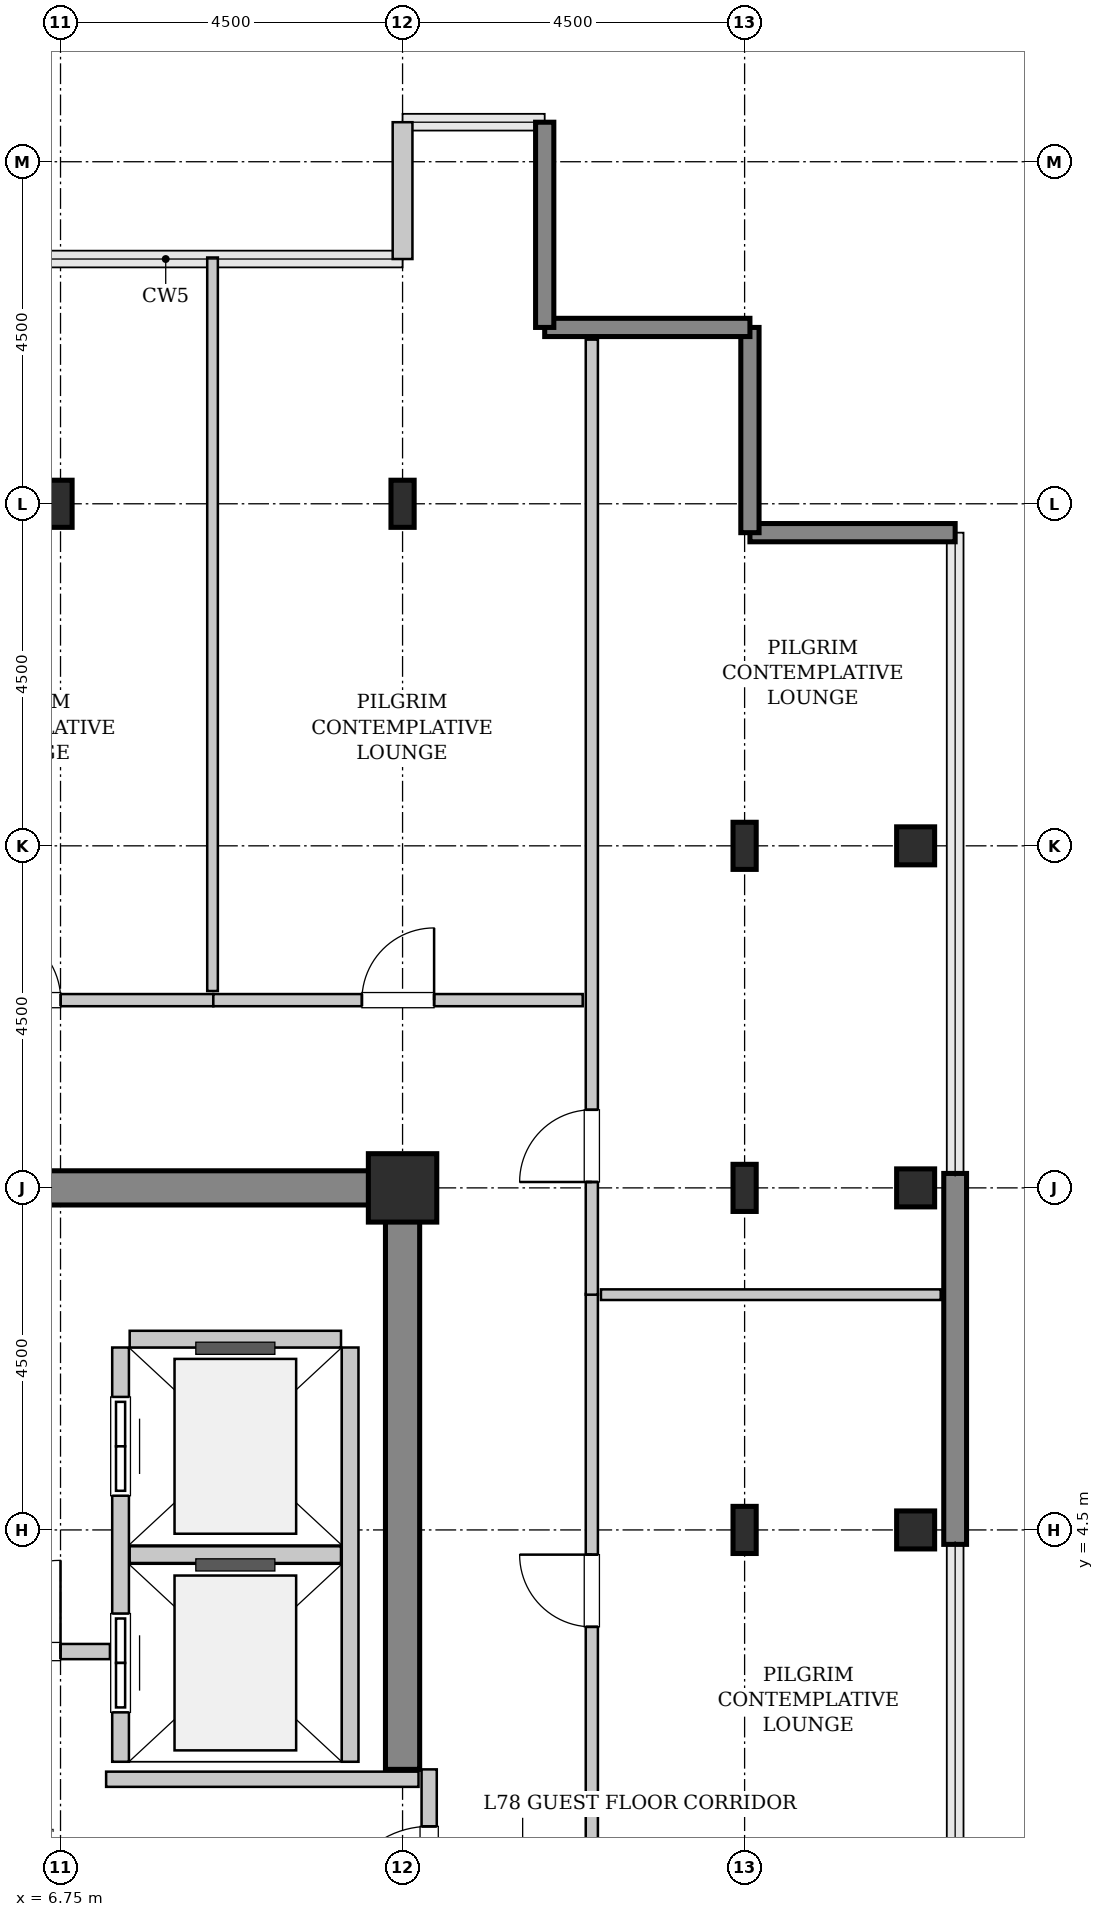
"""IFC4 building model, lengths in metres.
Left out: names, types, materials, properties, quantities, classifications, styles, units other than length and angle.
Written with IfcOpenShell. Run it as: python <this file> out.ifc"""

import sys

from ifc_helpers import new_model, si_unit, direction, frame, frame_2d, origin, origin_2d, place, context, subcontext, project, spatial, rectangle, hollow_rectangle, i_section, extrude, source, transform, mapped, element, fill, save


model = new_model("IFC4")
c1 = context("Model", 3, precision=1e-05, world=origin(), true_north=direction((0.0, 1.0)))
c2 = subcontext(c1, "Body", "Model", "MODEL_VIEW")
j1 = project(units=[si_unit("LENGTHUNIT", "METRE"), si_unit("PLANEANGLEUNIT", "RADIAN")], contexts=[c1])
p1 = place(None, origin())
s1 = spatial("IfcSite", under=j1, at=p1, CompositionType="ELEMENT")
p2 = place(p1, origin())
s2 = spatial("IfcBuilding", under=s1, at=p2, CompositionType="ELEMENT")
p3 = place(p2, frame((0.0, 0.0, 310.2)))
s3 = spatial("IfcBuildingStorey", under=s2, at=p3, CompositionType="ELEMENT", Elevation=310.2)
m1 = source(origin(), c2, "Body", "SweptSolid", [
    extrude(rectangle(XDim=9.925, YDim=0.45, at=frame_2d((4.962, 0.0))), origin(), (0.0, 0.0, 1.0), 3.8),
])
p4 = place(p3, frame((1.55, 9.0, 0.0), z_axis=(0.0, 0.0, 1.0), x_axis=(1.0, 0.0, 0.0)))
e1 = element("IfcWall", 1, at=p4, inside=s3, PredefinedType="SHEAR", context=c2, shape_type="MappedRepresentation", body=[
    mapped(m1, transform((0.0, 0.0, 0.0), x_axis=(1.0, 0.0, 0.0), y_axis=(0.0, 1.0, 0.0), z_axis=(0.0, 0.0, 1.0), scale=1.0)),
])
m2 = source(origin(), c2, "Body", "SweptSolid", [
    extrude(rectangle(XDim=7.425, YDim=0.45, at=frame_2d((3.712, 0.0))), origin(), (0.0, 0.0, 1.0), 3.8),
])
p5 = place(p3, frame((11.25, 1.35, 0.0), z_axis=(0.0, 0.0, 1.0), x_axis=(0.0, 1.0, 0.0)))
e2 = element("IfcWall", 2, at=p5, inside=s3, PredefinedType="SHEAR", context=c2, shape_type="MappedRepresentation", body=[
    mapped(m2, transform((0.0, 0.0, 0.0), x_axis=(1.0, 0.0, 0.0), y_axis=(0.0, 1.0, 0.0), z_axis=(0.0, 0.0, 1.0), scale=1.0)),
])
m3 = source(origin(), c2, "Body", "SweptSolid", [
    extrude(i_section(OverallWidth=0.305, OverallDepth=0.62, WebThickness=0.021, FlangeThickness=0.04, FilletRadius=0.027, at=origin_2d()), origin(), (0.0, 0.0, 1.0), 3.8),
])
p6 = place(p3, frame((6.75, 18.0, 0.0), z_axis=(0.0, 0.0, 1.0), x_axis=(1.0, 0.0, 0.0)))
e3 = element("IfcColumn", 3, at=p6, inside=s3, PredefinedType="COLUMN", context=c2, shape_type="MappedRepresentation", body=[
    mapped(m3, transform((0.0, 0.0, 0.0), x_axis=(1.0, 0.0, 0.0), y_axis=(0.0, 1.0, 0.0), z_axis=(0.0, 0.0, 1.0), scale=1.0)),
])
m4 = source(origin(), c2, "Body", "SweptSolid", [
    extrude(rectangle(XDim=0.9, YDim=0.9, at=origin_2d()), origin(), (0.0, 0.0, 1.0), 3.8),
])
p7 = place(p3, frame((11.25, 9.0, 0.0), z_axis=(0.0, 0.0, 1.0), x_axis=(1.0, 0.0, 0.0)))
e4 = element("IfcColumn", 4, at=p7, inside=s3, PredefinedType="COLUMN", context=c2, shape_type="MappedRepresentation", body=[
    mapped(m4, transform((0.0, 0.0, 0.0), x_axis=(1.0, 0.0, 0.0), y_axis=(0.0, 1.0, 0.0), z_axis=(0.0, 0.0, 1.0), scale=1.0)),
])
for number, where, z_axis, x_axis in (
    (5, (11.25, 18.0, 0.0), (0.0, 0.0, 1.0), (1.0, 0.0, 0.0)),
    (6, (15.75, 4.5, 0.0), (0.0, 0.0, 1.0), (1.0, 0.0, 0.0)),
    (7, (15.75, 9.0, 0.0), (0.0, 0.0, 1.0), (1.0, 0.0, 0.0)),
    (8, (15.75, 13.5, 0.0), (0.0, 0.0, 1.0), (1.0, 0.0, 0.0)),
):
    element("IfcColumn", number, at=place(p3, frame(where, z_axis=z_axis, x_axis=x_axis)), inside=s3, PredefinedType="COLUMN", context=c2, shape_type="MappedRepresentation", body=[
        mapped(m3, transform((0.0, 0.0, 0.0), x_axis=(1.0, 0.0, 0.0), y_axis=(0.0, 1.0, 0.0), z_axis=(0.0, 0.0, 1.0), scale=1.0)),
    ])
m5 = source(origin(), c2, "Body", "SweptSolid", [
    extrude(hollow_rectangle(XDim=0.5, YDim=0.5, WallThickness=0.025, InnerFilletRadius=0.025, OuterFilletRadius=0.05, at=origin_2d()), origin(), (0.0, 0.0, 1.0), 3.8),
])
for number, where, z_axis, x_axis in (
    (9, (18.0, 4.5, 0.0), (0.0, 0.0, 1.0), (1.0, 0.0, 0.0)),
    (10, (18.0, 9.0, 0.0), (0.0, 0.0, 1.0), (1.0, 0.0, 0.0)),
    (11, (18.0, 13.5, 0.0), (0.0, 0.0, 1.0), (1.0, 0.0, 0.0)),
):
    element("IfcColumn", number, at=place(p3, frame(where, z_axis=z_axis, x_axis=x_axis)), inside=s3, PredefinedType="COLUMN", context=c2, shape_type="MappedRepresentation", body=[
        mapped(m5, transform((0.0, 0.0, 0.0), x_axis=(1.0, 0.0, 0.0), y_axis=(0.0, 1.0, 0.0), z_axis=(0.0, 0.0, 1.0), scale=1.0)),
    ])
m6 = source(origin(), c2, "Body", "SweptSolid", [
    extrude(rectangle(XDim=4.88, YDim=0.3, at=frame_2d((2.44, 0.0))), origin(), (0.0, 0.0, 1.0), 3.55),
])
p8 = place(p3, frame((18.52, 4.31, 0.0), z_axis=(0.0, 0.0, 1.0), x_axis=(0.0, 1.0, 0.0)))
e12 = element("IfcWall", 12, at=p8, inside=s3, PredefinedType="SHEAR", context=c2, shape_type="MappedRepresentation", body=[
    mapped(m6, transform((0.0, 0.0, 0.0), x_axis=(1.0, 0.0, 0.0), y_axis=(0.0, 1.0, 0.0), z_axis=(0.0, 0.0, 1.0), scale=1.0)),
])
m7 = source(origin(), c2, "Body", "SweptSolid", [
    extrude(rectangle(XDim=2.7, YDim=0.24, at=frame_2d((1.35, 0.0))), origin(), (0.0, 0.0, 1.0), 3.55),
])
for number, where, z_axis, x_axis in (
    (13, (18.52, 17.62, 0.0), (0.0, 0.0, 1.0), (-1.0, 0.0, 0.0)),
    (14, (15.82, 17.62, 0.0), (0.0, 0.0, 1.0), (0.0, 1.0, 0.0)),
    (15, (15.82, 20.32, 0.0), (0.0, 0.0, 1.0), (-1.0, 0.0, 0.0)),
    (16, (13.12, 20.32, 0.0), (0.0, 0.0, 1.0), (0.0, 1.0, 0.0)),
):
    element("IfcWall", number, at=place(p3, frame(where, z_axis=z_axis, x_axis=x_axis)), inside=s3, PredefinedType="SHEAR", context=c2, shape_type="MappedRepresentation", body=[
        mapped(m7, transform((0.0, 0.0, 0.0), x_axis=(1.0, 0.0, 0.0), y_axis=(0.0, 1.0, 0.0), z_axis=(0.0, 0.0, 1.0), scale=1.0)),
    ])
m8 = source(origin(), c2, "Body", "SweptSolid", [
    extrude(rectangle(XDim=1.8, YDim=0.26, at=frame_2d((0.9, 0.0))), origin(), (0.0, 0.0, 1.0), 3.55),
])
p9 = place(p3, frame((11.25, 23.02, 0.0), z_axis=(0.0, 0.0, 1.0), x_axis=(0.0, -1.0, 0.0)))
e17 = element("IfcWall", 17, at=p9, inside=s3, PredefinedType="SOLIDWALL", context=c2, shape_type="MappedRepresentation", body=[
    mapped(m8, transform((0.0, 0.0, 0.0), x_axis=(1.0, 0.0, 0.0), y_axis=(0.0, 1.0, 0.0), z_axis=(0.0, 0.0, 1.0), scale=1.0)),
])
m9 = source(origin(), c2, "Body", "SweptSolid", [
    extrude(rectangle(XDim=5.45, YDim=0.22, at=frame_2d((2.725, 0.0))), origin(), (0.0, 0.0, 1.0), 3.535),
])
p10 = place(p3, frame((7.54, 6.9, 0.0), z_axis=(0.0, 0.0, 1.0), x_axis=(0.0, -1.0, 0.0)))
e18 = element("IfcWall", 18, at=p10, inside=s3, PredefinedType="SOLIDWALL", context=c2, shape_type="MappedRepresentation", body=[
    mapped(m9, transform((0.0, 0.0, 0.0), x_axis=(1.0, 0.0, 0.0), y_axis=(0.0, 1.0, 0.0), z_axis=(0.0, 0.0, 1.0), scale=1.0)),
])
p11 = place(p10, frame((3.5, 0.0, 0.0)))
e19 = element("IfcOpeningElement", 19, at=p11, cuts=e18, PredefinedType="OPENING", context=c2, shape_type="SweptSolid", body=[
    extrude(rectangle(XDim=1.3, YDim=2.3, at=frame_2d((0.65, 1.15))), frame((0.0, 0.12, 0.0), z_axis=(0.0, -1.0, 0.0), x_axis=(1.0, 0.0, 0.0)), (0.0, 0.0, 1.0), 0.24),
])
p12 = place(p10, frame((0.65, 0.0, 0.0)))
e20 = element("IfcOpeningElement", 20, at=p12, cuts=e18, PredefinedType="OPENING", context=c2, shape_type="SweptSolid", body=[
    extrude(rectangle(XDim=1.3, YDim=2.3, at=frame_2d((0.65, 1.15))), frame((0.0, 0.12, 0.0), z_axis=(0.0, -1.0, 0.0), x_axis=(1.0, 0.0, 0.0)), (0.0, 0.0, 1.0), 0.24),
])
p13 = place(p3, frame((10.56, 1.45, 0.0), z_axis=(0.0, 0.0, 1.0), x_axis=(0.0, 1.0, 0.0)))
e21 = element("IfcWall", 21, at=p13, inside=s3, PredefinedType="SOLIDWALL", context=c2, shape_type="MappedRepresentation", body=[
    mapped(m9, transform((0.0, 0.0, 0.0), x_axis=(1.0, 0.0, 0.0), y_axis=(0.0, 1.0, 0.0), z_axis=(0.0, 0.0, 1.0), scale=1.0)),
])
m10 = source(origin(), c2, "Body", "SweptSolid", [
    extrude(rectangle(XDim=2.78, YDim=0.22, at=frame_2d((1.39, 0.0))), origin(), (0.0, 0.0, 1.0), 3.535),
])
for number, where, z_axis, x_axis in (
    (22, (7.66, 4.175, 0.0), (0.0, 0.0, 1.0), (1.0, 0.0, 0.0)),
    (23, (10.44, 7.01, 0.0), (0.0, 0.0, 1.0), (-1.0, 0.0, 0.0)),
):
    element("IfcWall", number, at=place(p3, frame(where, z_axis=z_axis, x_axis=x_axis)), inside=s3, PredefinedType="SOLIDWALL", context=c2, shape_type="MappedRepresentation", body=[
        mapped(m10, transform((0.0, 0.0, 0.0), x_axis=(1.0, 0.0, 0.0), y_axis=(0.0, 1.0, 0.0), z_axis=(0.0, 0.0, 1.0), scale=1.0)),
    ])
m11 = source(origin(), c2, "Body", "SweptSolid", [
    extrude(rectangle(XDim=2.7, YDim=0.2, at=frame_2d((1.35, 0.0))), origin(), (0.0, 0.0, 1.0), 2.625),
])
p14 = place(p3, frame((11.6, -1.35, 0.0), z_axis=(0.0, 0.0, 1.0), x_axis=(0.0, 1.0, 0.0)))
e24 = element("IfcWall", 24, at=p14, inside=s3, PredefinedType="PARTITIONING", context=c2, shape_type="MappedRepresentation", body=[
    mapped(m11, transform((0.0, 0.0, 0.0), x_axis=(1.0, 0.0, 0.0), y_axis=(0.0, 1.0, 0.0), z_axis=(0.0, 0.0, 1.0), scale=1.0)),
])
p15 = place(p14, frame((0.75, 0.0, 0.0)))
e25 = element("IfcOpeningElement", 25, at=p15, cuts=e24, PredefinedType="OPENING", context=c2, shape_type="SweptSolid", body=[
    extrude(rectangle(XDim=1.2, YDim=2.15, at=frame_2d((0.6, 1.075))), frame((0.0, 0.11, 0.0), z_axis=(0.0, -1.0, 0.0), x_axis=(1.0, 0.0, 0.0)), (0.0, 0.0, 1.0), 0.22),
])
m12 = source(origin(), c2, "Body", "SweptSolid", [
    extrude(rectangle(XDim=3.04, YDim=0.2, at=frame_2d((1.52, 0.0))), origin(), (0.0, 0.0, 1.0), 3.535),
])
p16 = place(p3, frame((4.36, 2.9, 0.0), z_axis=(0.0, 0.0, 1.0), x_axis=(1.0, 0.0, 0.0)))
e26 = element("IfcWall", 26, at=p16, inside=s3, PredefinedType="PARTITIONING", context=c2, shape_type="MappedRepresentation", body=[
    mapped(m12, transform((0.0, 0.0, 0.0), x_axis=(1.0, 0.0, 0.0), y_axis=(0.0, 1.0, 0.0), z_axis=(0.0, 0.0, 1.0), scale=1.0)),
])
p17 = place(p16, frame((1.19, 0.0, 0.0)))
e27 = element("IfcOpeningElement", 27, at=p17, cuts=e26, PredefinedType="OPENING", context=c2, shape_type="SweptSolid", body=[
    extrude(rectangle(XDim=1.2, YDim=2.15, at=frame_2d((0.6, 1.075))), frame((0.0, 0.11, 0.0), z_axis=(0.0, -1.0, 0.0), x_axis=(1.0, 0.0, 0.0)), (0.0, 0.0, 1.0), 0.22),
])
m13 = source(origin(), c2, "Body", "SweptSolid", [
    extrude(rectangle(XDim=4.11, YDim=0.2, at=frame_2d((2.055, 0.0))), origin(), (0.0, 0.0, 1.0), 3.535),
])
p18 = place(p3, frame((7.35, 1.22, 0.0), z_axis=(0.0, 0.0, 1.0), x_axis=(1.0, 0.0, 0.0)))
e28 = element("IfcWall", 28, at=p18, inside=s3, PredefinedType="PARTITIONING", context=c2, shape_type="MappedRepresentation", body=[
    mapped(m13, transform((0.0, 0.0, 0.0), x_axis=(1.0, 0.0, 0.0), y_axis=(0.0, 1.0, 0.0), z_axis=(0.0, 0.0, 1.0), scale=1.0)),
])
m14 = source(origin(), c2, "Body", "SweptSolid", [
    extrude(rectangle(XDim=7.81, YDim=0.16, at=frame_2d((3.905, 0.0))), origin(), (0.0, 0.0, 1.0), 3.535),
])
p19 = place(p3, frame((13.74, -0.205, 0.0), z_axis=(0.0, 0.0, 1.0), x_axis=(0.0, 1.0, 0.0)))
e29 = element("IfcWall", 29, at=p19, inside=s3, PredefinedType="PARTITIONING", context=c2, shape_type="MappedRepresentation", body=[
    mapped(m14, transform((0.0, 0.0, 0.0), x_axis=(1.0, 0.0, 0.0), y_axis=(0.0, 1.0, 0.0), z_axis=(0.0, 0.0, 1.0), scale=1.0)),
])
p20 = place(p19, frame((3.43, 0.0, 0.0)))
e30 = element("IfcOpeningElement", 30, at=p20, cuts=e29, PredefinedType="OPENING", context=c2, shape_type="SweptSolid", body=[
    extrude(rectangle(XDim=0.95, YDim=2.1, at=frame_2d((0.475, 1.05))), frame((0.0, 0.09, 0.0), z_axis=(0.0, -1.0, 0.0), x_axis=(1.0, 0.0, 0.0)), (0.0, 0.0, 1.0), 0.18),
])
m15 = source(origin(), c2, "Body", "SweptSolid", [
    extrude(rectangle(XDim=4.47, YDim=0.14, at=frame_2d((2.235, 0.0))), origin(), (0.0, 0.0, 1.0), 3.535),
])
p21 = place(p3, frame((13.86, 7.595, 0.0), z_axis=(0.0, 0.0, 1.0), x_axis=(1.0, 0.0, 0.0)))
e31 = element("IfcWall", 31, at=p21, inside=s3, PredefinedType="PARTITIONING", context=c2, shape_type="MappedRepresentation", body=[
    mapped(m15, transform((0.0, 0.0, 0.0), x_axis=(1.0, 0.0, 0.0), y_axis=(0.0, 1.0, 0.0), z_axis=(0.0, 0.0, 1.0), scale=1.0)),
])
m16 = source(origin(), c2, "Body", "SweptSolid", [
    extrude(rectangle(XDim=12.565, YDim=0.16, at=frame_2d((6.282, 0.0))), origin(), (0.0, 0.0, 1.0), 3.535),
])
p22 = place(p3, frame((13.74, 7.595, 0.0), z_axis=(0.0, 0.0, 1.0), x_axis=(0.0, 1.0, 0.0)))
e32 = element("IfcWall", 32, at=p22, inside=s3, PredefinedType="PARTITIONING", context=c2, shape_type="MappedRepresentation", body=[
    mapped(m16, transform((0.0, 0.0, 0.0), x_axis=(1.0, 0.0, 0.0), y_axis=(0.0, 1.0, 0.0), z_axis=(0.0, 0.0, 1.0), scale=1.0)),
])
p23 = place(p22, frame((1.482, 0.0, 0.0)))
e33 = element("IfcOpeningElement", 33, at=p23, cuts=e32, PredefinedType="OPENING", context=c2, shape_type="SweptSolid", body=[
    extrude(rectangle(XDim=0.95, YDim=2.1, at=frame_2d((0.475, 1.05))), frame((0.0, 0.09, 0.0), z_axis=(0.0, -1.0, 0.0), x_axis=(1.0, 0.0, 0.0)), (0.0, 0.0, 1.0), 0.18),
])
m17 = source(origin(), c2, "Body", "SweptSolid", [
    extrude(rectangle(XDim=4.965, YDim=0.16, at=frame_2d((2.482, 0.0))), origin(), (0.0, 0.0, 1.0), 3.535),
])
p24 = place(p3, frame((3.795, 11.47, 0.0), z_axis=(0.0, 0.0, 1.0), x_axis=(1.0, 0.0, 0.0)))
e34 = element("IfcWall", 34, at=p24, inside=s3, PredefinedType="PARTITIONING", context=c2, shape_type="MappedRepresentation", body=[
    mapped(m17, transform((0.0, 0.0, 0.0), x_axis=(1.0, 0.0, 0.0), y_axis=(0.0, 1.0, 0.0), z_axis=(0.0, 0.0, 1.0), scale=1.0)),
])
p25 = place(p24, frame((2.008, 0.0, 0.0)))
e35 = element("IfcOpeningElement", 35, at=p25, cuts=e34, PredefinedType="OPENING", context=c2, shape_type="SweptSolid", body=[
    extrude(rectangle(XDim=0.95, YDim=2.1, at=frame_2d((0.475, 1.05))), frame((0.0, 0.09, 0.0), z_axis=(0.0, -1.0, 0.0), x_axis=(1.0, 0.0, 0.0)), (0.0, 0.0, 1.0), 0.18),
])
m18 = source(origin(), c2, "Body", "SweptSolid", [
    extrude(rectangle(XDim=9.65, YDim=0.14, at=frame_2d((4.825, 0.0))), origin(), (0.0, 0.0, 1.0), 3.535),
])
p26 = place(p3, frame((8.75, 11.59, 0.0), z_axis=(0.0, 0.0, 1.0), x_axis=(0.0, 1.0, 0.0)))
e36 = element("IfcWall", 36, at=p26, inside=s3, PredefinedType="PARTITIONING", context=c2, shape_type="MappedRepresentation", body=[
    mapped(m18, transform((0.0, 0.0, 0.0), x_axis=(1.0, 0.0, 0.0), y_axis=(0.0, 1.0, 0.0), z_axis=(0.0, 0.0, 1.0), scale=1.0)),
])
m19 = source(origin(), c2, "Body", "SweptSolid", [
    extrude(rectangle(XDim=4.86, YDim=0.16, at=frame_2d((2.43, 0.0))), origin(), (0.0, 0.0, 1.0), 3.535),
])
p27 = place(p3, frame((8.76, 11.47, 0.0), z_axis=(0.0, 0.0, 1.0), x_axis=(1.0, 0.0, 0.0)))
e37 = element("IfcWall", 37, at=p27, inside=s3, PredefinedType="PARTITIONING", context=c2, shape_type="MappedRepresentation", body=[
    mapped(m19, transform((0.0, 0.0, 0.0), x_axis=(1.0, 0.0, 0.0), y_axis=(0.0, 1.0, 0.0), z_axis=(0.0, 0.0, 1.0), scale=1.0)),
])
p28 = place(p27, frame((1.955, 0.0, 0.0)))
e38 = element("IfcOpeningElement", 38, at=p28, cuts=e37, PredefinedType="OPENING", context=c2, shape_type="SweptSolid", body=[
    extrude(rectangle(XDim=0.95, YDim=2.1, at=frame_2d((0.475, 1.05))), frame((0.0, 0.09, 0.0), z_axis=(0.0, -1.0, 0.0), x_axis=(1.0, 0.0, 0.0)), (0.0, 0.0, 1.0), 0.18),
])
m20 = source(origin(), c2, "Body", "SweptSolid", [
    extrude(rectangle(XDim=1.3, YDim=2.3, at=frame_2d((0.65, 1.15))), frame((0.0, 0.025, 0.0), z_axis=(0.0, -1.0, 0.0), x_axis=(1.0, 0.0, 0.0)), (0.0, 0.0, 1.0), 0.05),
])
p29 = place(p11, origin())
e39 = element("IfcDoor", 39, at=p29, inside=s3, OperationType="SLIDING_TO_RIGHT", PredefinedType="DOOR", context=c2, shape_type="MappedRepresentation", body=[
    mapped(m20, transform((0.0, 0.0, 0.0), x_axis=(1.0, 0.0, 0.0), y_axis=(0.0, 1.0, 0.0), z_axis=(0.0, 0.0, 1.0), scale=1.0)),
])
fill(e19, e39)
p30 = place(p12, origin())
e40 = element("IfcDoor", 40, at=p30, inside=s3, OperationType="SLIDING_TO_RIGHT", PredefinedType="DOOR", context=c2, shape_type="MappedRepresentation", body=[
    mapped(m20, transform((0.0, 0.0, 0.0), x_axis=(1.0, 0.0, 0.0), y_axis=(0.0, 1.0, 0.0), z_axis=(0.0, 0.0, 1.0), scale=1.0)),
])
fill(e20, e40)
m21 = source(origin(), c2, "Body", "SweptSolid", [
    extrude(rectangle(XDim=1.2, YDim=2.15, at=frame_2d((0.6, 1.075))), frame((0.0, 0.025, 0.0), z_axis=(0.0, -1.0, 0.0), x_axis=(1.0, 0.0, 0.0)), (0.0, 0.0, 1.0), 0.05),
])
p31 = place(p15, origin())
e41 = element("IfcDoor", 41, at=p31, inside=s3, OperationType="SINGLE_SWING_LEFT", PredefinedType="DOOR", context=c2, shape_type="MappedRepresentation", body=[
    mapped(m21, transform((0.0, 0.0, 0.0), x_axis=(1.0, 0.0, 0.0), y_axis=(0.0, 1.0, 0.0), z_axis=(0.0, 0.0, 1.0), scale=1.0)),
])
fill(e25, e41)
p32 = place(p17, origin())
e42 = element("IfcDoor", 42, at=p32, inside=s3, OperationType="SINGLE_SWING_RIGHT", PredefinedType="DOOR", context=c2, shape_type="MappedRepresentation", body=[
    mapped(m21, transform((0.0, 0.0, 0.0), x_axis=(1.0, 0.0, 0.0), y_axis=(0.0, 1.0, 0.0), z_axis=(0.0, 0.0, 1.0), scale=1.0)),
])
fill(e27, e42)
m22 = source(origin(), c2, "Body", "SweptSolid", [
    extrude(rectangle(XDim=0.95, YDim=2.1, at=frame_2d((0.475, 1.05))), frame((0.0, 0.025, 0.0), z_axis=(0.0, -1.0, 0.0), x_axis=(1.0, 0.0, 0.0)), (0.0, 0.0, 1.0), 0.05),
])
p33 = place(p20, origin())
e43 = element("IfcDoor", 43, at=p33, inside=s3, OperationType="SINGLE_SWING_RIGHT", PredefinedType="DOOR", context=c2, shape_type="MappedRepresentation", body=[
    mapped(m22, transform((0.0, 0.0, 0.0), x_axis=(1.0, 0.0, 0.0), y_axis=(0.0, 1.0, 0.0), z_axis=(0.0, 0.0, 1.0), scale=1.0)),
])
fill(e30, e43)
p34 = place(p23, origin())
e44 = element("IfcDoor", 44, at=p34, inside=s3, OperationType="SINGLE_SWING_LEFT", PredefinedType="DOOR", context=c2, shape_type="MappedRepresentation", body=[
    mapped(m22, transform((0.0, 0.0, 0.0), x_axis=(1.0, 0.0, 0.0), y_axis=(0.0, 1.0, 0.0), z_axis=(0.0, 0.0, 1.0), scale=1.0)),
])
fill(e33, e44)
p35 = place(p25, origin())
e45 = element("IfcDoor", 45, at=p35, inside=s3, OperationType="SINGLE_SWING_LEFT", PredefinedType="DOOR", context=c2, shape_type="MappedRepresentation", body=[
    mapped(m22, transform((0.0, 0.0, 0.0), x_axis=(1.0, 0.0, 0.0), y_axis=(0.0, 1.0, 0.0), z_axis=(0.0, 0.0, 1.0), scale=1.0)),
])
fill(e35, e45)
p36 = place(p28, origin())
e46 = element("IfcDoor", 46, at=p36, inside=s3, OperationType="SINGLE_SWING_RIGHT", PredefinedType="DOOR", context=c2, shape_type="MappedRepresentation", body=[
    mapped(m22, transform((0.0, 0.0, 0.0), x_axis=(1.0, 0.0, 0.0), y_axis=(0.0, 1.0, 0.0), z_axis=(0.0, 0.0, 1.0), scale=1.0)),
])
fill(e38, e46)
save(model, sys.argv[1])
